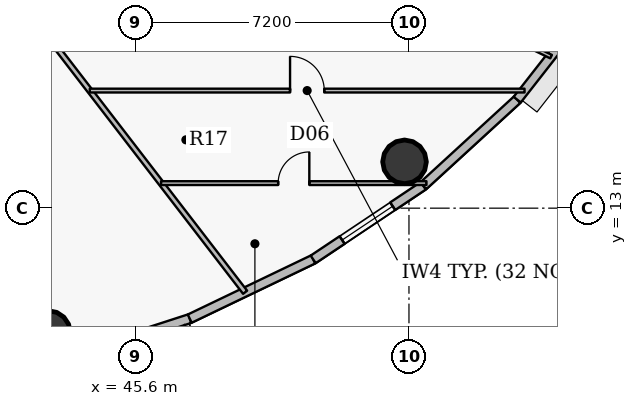
"""IFC4 building model, lengths in metres.
Left out: names, types, materials, properties, quantities, classifications, styles, units other than length and angle.
Written with IfcOpenShell. Run it as: python <this file> out.ifc"""

import sys

from ifc_helpers import new_model, si_unit, direction, frame, frame_2d, origin, origin_2d, place, context, subcontext, project, spatial, rectangle, hollow_circle, extrude, source, transform, mapped, element, fill, save


model = new_model("IFC4")
c1 = context("Model", 3, precision=1e-05, world=origin(), true_north=direction((0.0, 1.0)))
c2 = subcontext(c1, "Body", "Model", "MODEL_VIEW")
j1 = project(units=[si_unit("LENGTHUNIT", "METRE"), si_unit("PLANEANGLEUNIT", "RADIAN")], contexts=[c1])
p1 = place(None, origin())
s1 = spatial("IfcSite", under=j1, at=p1, CompositionType="ELEMENT")
p2 = place(p1, origin())
s2 = spatial("IfcBuilding", under=s1, at=p2, CompositionType="ELEMENT")
p3 = place(p2, frame((0.0, 0.0, 225.3)))
s3 = spatial("IfcBuildingStorey", under=s2, at=p3, CompositionType="ELEMENT", Elevation=225.3)
for number, where, z_axis, x_axis in (
    (1, (43.312, 9.727, 0.0), (0.0, 0.0, 1.0), (1.0, 0.0, 0.0)),
    (2, (52.683, 14.219, 0.0), (0.0, 0.0, 1.0), (1.0, 0.0, 0.0)),
):
    element("IfcColumn", number, at=place(p3, frame(where, z_axis=z_axis, x_axis=x_axis)), inside=s3, PredefinedType="COLUMN", context=c2, shape_type="SweptSolid", body=[
        extrude(hollow_circle(Radius=0.575, WallThickness=0.036, at=origin_2d()), origin(), (0.0, 0.0, 1.0), 3.75),
    ])
p4 = place(p3, frame((47.031, 10.094, 0.0), z_axis=(0.0, 0.0, 1.0), x_axis=(-0.951210789182, -0.308541787354, 0.0)))
e3 = element("IfcWall", 3, at=p4, inside=s3, PredefinedType="SOLIDWALL", context=c2, shape_type="SweptSolid", body=[
    extrude(rectangle(XDim=3.702, YDim=0.24, at=frame_2d((1.851, 0.0))), origin(), (0.0, 0.0, 1.0), 3.5),
])
p5 = place(p4, frame((1.326, 0.0, 0.0)))
e4 = element("IfcOpeningElement", 4, at=p5, cuts=e3, PredefinedType="OPENING", context=c2, shape_type="SweptSolid", body=[
    extrude(rectangle(XDim=1.05, YDim=2.15, at=origin_2d()), frame((0.525, 0.13, 1.075), z_axis=(0.0, -1.0, 0.0), x_axis=(1.0, 0.0, 0.0)), (0.0, 0.0, 1.0), 0.26),
])
p6 = place(p3, frame((50.28, 11.652, 0.0), z_axis=(0.0, 0.0, 1.0), x_axis=(-0.901598104751, -0.432574684313, 0.0)))
e5 = element("IfcWall", 5, at=p6, inside=s3, PredefinedType="SOLIDWALL", context=c2, shape_type="SweptSolid", body=[
    extrude(rectangle(XDim=3.604, YDim=0.24, at=frame_2d((1.802, 0.0))), origin(), (0.0, 0.0, 1.0), 3.5),
])
p7 = place(p3, frame((53.176, 13.589, 0.0), z_axis=(0.0, 0.0, 1.0), x_axis=(-0.831262496074, -0.555880079352, 0.0)))
e6 = element("IfcWall", 6, at=p7, inside=s3, PredefinedType="SOLIDWALL", context=c2, shape_type="SweptSolid", body=[
    extrude(rectangle(XDim=3.484, YDim=0.24, at=frame_2d((1.742, 0.0))), origin(), (0.0, 0.0, 1.0), 3.5),
])
p8 = place(p7, frame((0.968, 0.0, 0.9)))
e7 = element("IfcOpeningElement", 7, at=p8, cuts=e6, PredefinedType="OPENING", context=c2, shape_type="SweptSolid", body=[
    extrude(rectangle(XDim=1.6, YDim=1.75, at=origin_2d()), frame((0.8, 0.13, 0.875), z_axis=(0.0, -1.0, 0.0), x_axis=(1.0, 0.0, 0.0)), (0.0, 0.0, 1.0), 0.26),
])
p9 = place(p3, frame((55.648, 15.855, 0.0), z_axis=(0.0, 0.0, 1.0), x_axis=(-0.737123922599, -0.675757591694, 0.0)))
e8 = element("IfcWall", 8, at=p9, inside=s3, PredefinedType="SOLIDWALL", context=c2, shape_type="SweptSolid", body=[
    extrude(rectangle(XDim=3.354, YDim=0.24, at=frame_2d((1.677, 0.0))), origin(), (0.0, 0.0, 1.0), 3.5),
])
p10 = place(p3, frame((57.636, 18.395, 0.0), z_axis=(0.0, 0.0, 1.0), x_axis=(-0.616312344705, -0.787501805562, 0.0)))
e9 = element("IfcWall", 9, at=p10, inside=s3, PredefinedType="SOLIDWALL", context=c2, shape_type="SweptSolid", body=[
    extrude(rectangle(XDim=3.225, YDim=0.24, at=frame_2d((1.612, 0.0))), origin(), (0.0, 0.0, 1.0), 3.5),
])
p11 = place(p3, frame((42.817, 18.15, 0.0), z_axis=(0.0, 0.0, 1.0), x_axis=(0.610231128601, -0.792223434194, 0.0)))
e10 = element("IfcWall", 10, at=p11, inside=s3, PredefinedType="PARTITIONING", context=c2, shape_type="SweptSolid", body=[
    extrude(rectangle(XDim=9.294, YDim=0.135, at=frame_2d((4.647, 0.0))), origin(), (0.0, 0.0, 1.0), 2.985),
])
p12 = place(p3, frame((44.401, 16.094, 0.0), z_axis=(0.0, 0.0, 1.0), x_axis=(1.0, 0.0, 0.0)))
e11 = element("IfcWall", 11, at=p12, inside=s3, PredefinedType="PARTITIONING", context=c2, shape_type="SweptSolid", body=[
    extrude(rectangle(XDim=11.441, YDim=0.1, at=frame_2d((5.72, 0.0))), origin(), (0.0, 0.0, 1.0), 2.935),
])
p13 = place(p12, frame((5.271, 0.0, 0.0)))
e12 = element("IfcOpeningElement", 12, at=p13, cuts=e11, PredefinedType="OPENING", context=c2, shape_type="SweptSolid", body=[
    extrude(rectangle(XDim=0.9, YDim=2.1, at=origin_2d()), frame((0.45, 0.06, 1.05), z_axis=(0.0, -1.0, 0.0), x_axis=(1.0, 0.0, 0.0)), (0.0, 0.0, 1.0), 0.12),
])
p14 = place(p3, frame((46.276, 13.659, 0.0), z_axis=(0.0, 0.0, 1.0), x_axis=(1.0, 0.0, 0.0)))
e13 = element("IfcWall", 13, at=p14, inside=s3, PredefinedType="PARTITIONING", context=c2, shape_type="SweptSolid", body=[
    extrude(rectangle(XDim=6.984, YDim=0.1, at=frame_2d((3.492, 0.0))), origin(), (0.0, 0.0, 1.0), 2.985),
])
p15 = place(p14, frame((3.082, 0.0, 0.0)))
e14 = element("IfcOpeningElement", 14, at=p15, cuts=e13, PredefinedType="OPENING", context=c2, shape_type="SweptSolid", body=[
    extrude(rectangle(XDim=0.82, YDim=2.1, at=origin_2d()), frame((0.41, 0.06, 1.05), z_axis=(0.0, -1.0, 0.0), x_axis=(1.0, 0.0, 0.0)), (0.0, 0.0, 1.0), 0.12),
])
p16 = place(p3, frame((50.374, 19.993, 0.0), z_axis=(0.0, 0.0, 1.0), x_axis=(0.898866241562, -0.438223093618, 0.0)))
e15 = element("IfcWall", 15, at=p16, inside=s3, PredefinedType="PARTITIONING", context=c2, shape_type="SweptSolid", body=[
    extrude(rectangle(XDim=6.86, YDim=0.1, at=frame_2d((3.43, 0.0))), origin(), (0.0, 0.0, 1.0), 2.985),
])
p17 = place(p16, frame((2.98, 0.0, 0.0)))
e16 = element("IfcOpeningElement", 16, at=p17, cuts=e15, PredefinedType="OPENING", context=c2, shape_type="SweptSolid", body=[
    extrude(rectangle(XDim=0.9, YDim=2.1, at=origin_2d()), frame((0.45, 0.06, 1.05), z_axis=(0.0, -1.0, 0.0), x_axis=(1.0, 0.0, 0.0)), (0.0, 0.0, 1.0), 0.12),
])
m1 = source(origin(), c2, "Body", "SweptSolid", [
    extrude(rectangle(XDim=1.6, YDim=1.75, at=origin_2d()), frame((0.8, 0.03, 0.875), z_axis=(0.0, -1.0, 0.0), x_axis=(1.0, 0.0, 0.0)), (0.0, 0.0, 1.0), 0.06),
])
p18 = place(p8, origin())
e17 = element("IfcWindow", 17, at=p18, inside=s3, PartitioningType="DOUBLE_PANEL_VERTICAL", PredefinedType="WINDOW", context=c2, shape_type="MappedRepresentation", body=[
    mapped(m1, transform((0.0, 0.0, 0.0), x_axis=(1.0, 0.0, 0.0), y_axis=(0.0, 1.0, 0.0), z_axis=(0.0, 0.0, 1.0), scale=1.0)),
])
fill(e7, e17)
m2 = source(origin(), c2, "Body", "SweptSolid", [
    extrude(rectangle(XDim=0.9, YDim=2.1, at=origin_2d()), frame((0.45, 0.025, 1.05), z_axis=(0.0, -1.0, 0.0), x_axis=(1.0, 0.0, 0.0)), (0.0, 0.0, 1.0), 0.05),
])
p19 = place(p13, origin())
e18 = element("IfcDoor", 18, at=p19, inside=s3, OperationType="SINGLE_SWING_LEFT", PredefinedType="DOOR", context=c2, shape_type="MappedRepresentation", body=[
    mapped(m2, transform((0.0, 0.0, 0.0), x_axis=(1.0, 0.0, 0.0), y_axis=(0.0, 1.0, 0.0), z_axis=(0.0, 0.0, 1.0), scale=1.0)),
])
fill(e12, e18)
m3 = source(origin(), c2, "Body", "SweptSolid", [
    extrude(rectangle(XDim=0.82, YDim=2.1, at=origin_2d()), frame((0.41, 0.025, 1.05), z_axis=(0.0, -1.0, 0.0), x_axis=(1.0, 0.0, 0.0)), (0.0, 0.0, 1.0), 0.05),
])
p20 = place(p15, origin())
e19 = element("IfcDoor", 19, at=p20, inside=s3, OperationType="SINGLE_SWING_RIGHT", PredefinedType="DOOR", context=c2, shape_type="MappedRepresentation", body=[
    mapped(m3, transform((0.0, 0.0, 0.0), x_axis=(1.0, 0.0, 0.0), y_axis=(0.0, 1.0, 0.0), z_axis=(0.0, 0.0, 1.0), scale=1.0)),
])
fill(e14, e19)
save(model, sys.argv[1])
